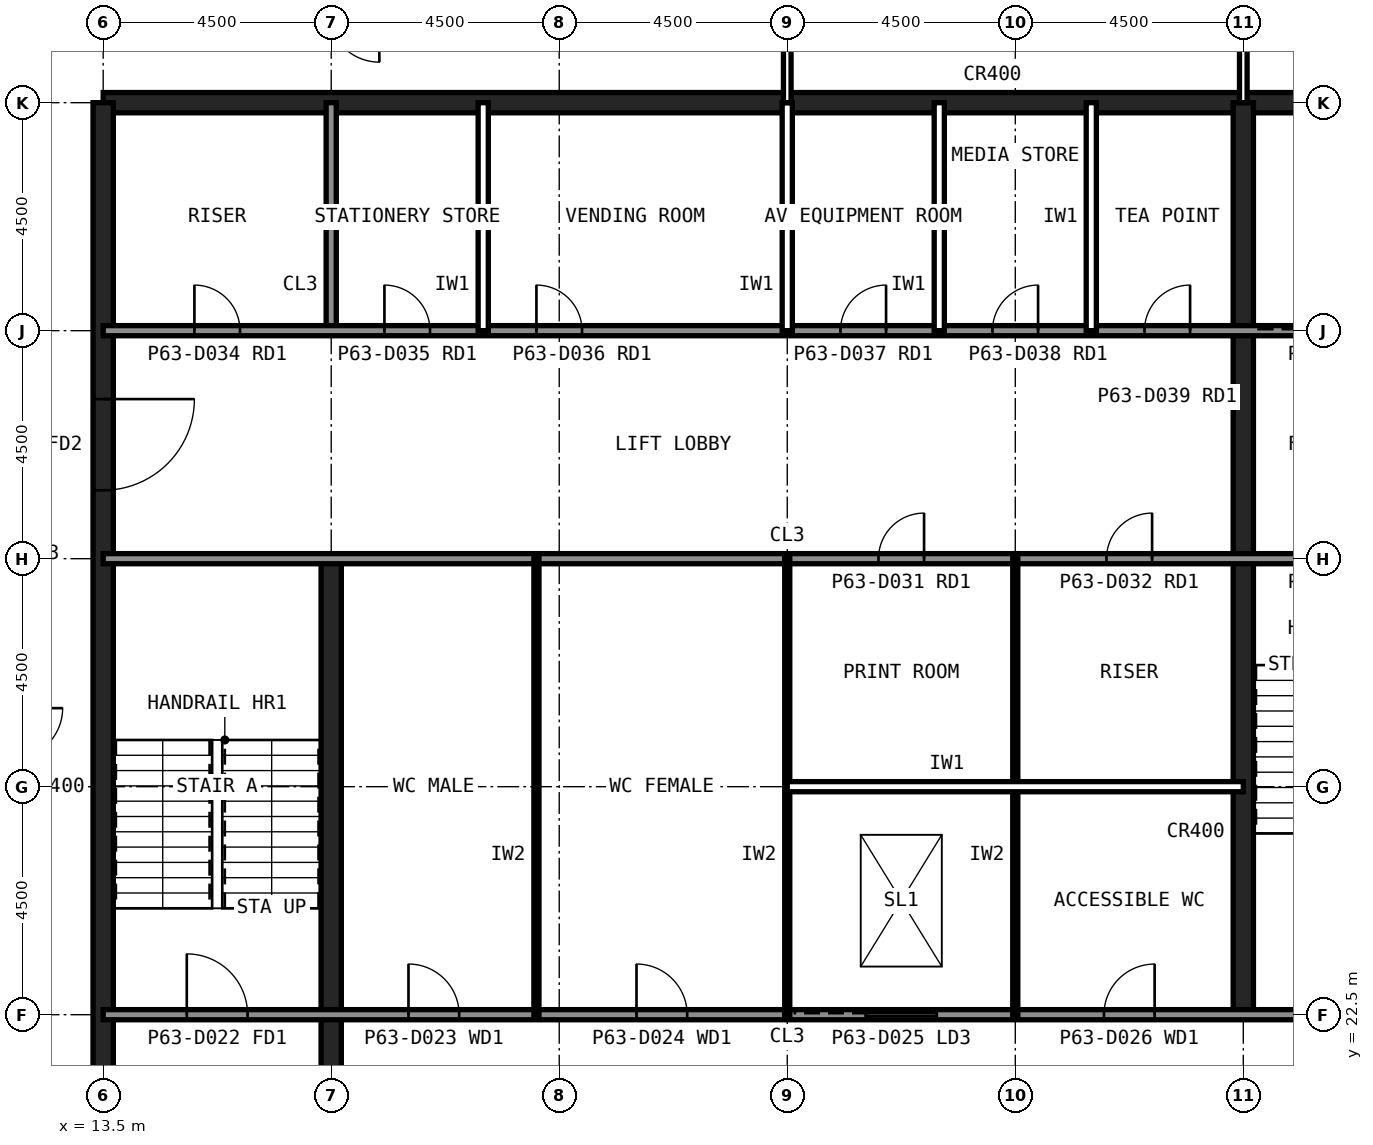
"""IFC4 building model, lengths in metres.
Left out: names, types, materials, properties, quantities, classifications, styles, units other than length and angle.
Written with IfcOpenShell. Run it as: python <this file> out.ifc"""

import sys

from ifc_helpers import new_model, si_unit, direction, frame, frame_2d, origin, place, context, subcontext, project, spatial, rectangle, extrude, element, fill, save


model = new_model("IFC4")
c1 = context("Model", 3, precision=1e-05, world=origin(), true_north=direction((0.0, 1.0)))
c2 = subcontext(c1, "Body", "Model", "MODEL_VIEW")
j1 = project(units=[si_unit("LENGTHUNIT", "METRE"), si_unit("PLANEANGLEUNIT", "RADIAN")], contexts=[c1])
p1 = place(None, origin())
s1 = spatial("IfcSite", under=j1, at=p1, CompositionType="ELEMENT")
p2 = place(p1, origin())
s2 = spatial("IfcBuilding", under=s1, at=p2, CompositionType="ELEMENT")
p3 = place(p2, frame((0.0, 0.0, 262.6)))
s3 = spatial("IfcBuildingStorey", under=s2, at=p3, CompositionType="ELEMENT", Elevation=262.6)
p4 = place(p3, frame((40.5, 40.5, 0.0), z_axis=(0.0, 0.0, 1.0), x_axis=(-1.0, 0.0, 0.0)))
e1 = element("IfcWall", 1, at=p4, inside=s3, PredefinedType="SHEAR", context=c2, shape_type="SweptSolid", body=[
    extrude(rectangle(XDim=27.0, YDim=0.4, at=frame_2d((13.5, 0.0))), origin(), (0.0, 0.0, 1.0), 4.0),
])
p5 = place(p3, frame((13.5, 40.5, 0.0), z_axis=(0.0, 0.0, 1.0), x_axis=(0.0, -1.0, 0.0)))
e2 = element("IfcWall", 2, at=p5, inside=s3, PredefinedType="SHEAR", context=c2, shape_type="SweptSolid", body=[
    extrude(rectangle(XDim=27.0, YDim=0.4, at=frame_2d((13.5, 0.0))), origin(), (0.0, 0.0, 1.0), 4.0),
])
p6 = place(p5, frame((19.65, 0.0, 0.0)))
e3 = element("IfcOpeningElement", 3, at=p6, cuts=e2, PredefinedType="OPENING", context=c2, shape_type="SweptSolid", body=[
    extrude(rectangle(XDim=1.2, YDim=2.1, at=frame_2d((0.6, 1.05))), frame((0.0, 0.21, 0.0), z_axis=(0.0, -1.0, 0.0), x_axis=(1.0, 0.0, 0.0)), (0.0, 0.0, 1.0), 0.42),
])
p7 = place(p5, frame((5.85, 0.0, 0.0)))
e4 = element("IfcOpeningElement", 4, at=p7, cuts=e2, PredefinedType="OPENING", context=c2, shape_type="SweptSolid", body=[
    extrude(rectangle(XDim=1.8, YDim=2.1, at=frame_2d((0.9, 1.05))), frame((0.0, 0.21, 0.0), z_axis=(0.0, -1.0, 0.0), x_axis=(1.0, 0.0, 0.0)), (0.0, 0.0, 1.0), 0.42),
])
p8 = place(p3, frame((18.0, 13.5, 0.0), z_axis=(0.0, 0.0, 1.0), x_axis=(0.0, 1.0, 0.0)))
e5 = element("IfcWall", 5, at=p8, inside=s3, PredefinedType="SHEAR", context=c2, shape_type="SweptSolid", body=[
    extrude(rectangle(XDim=18.0, YDim=0.4, at=frame_2d((9.0, 0.0))), origin(), (0.0, 0.0, 1.0), 4.0),
])
p9 = place(p3, frame((18.0, 36.0, 0.0), z_axis=(0.0, 0.0, 1.0), x_axis=(0.0, 1.0, 0.0)))
e6 = element("IfcWall", 6, at=p9, inside=s3, PredefinedType="SOLIDWALL", context=c2, shape_type="SweptSolid", body=[
    extrude(rectangle(XDim=4.5, YDim=0.2, at=frame_2d((2.25, 0.0))), origin(), (0.0, 0.0, 1.0), 3.84),
])
p10 = place(p3, frame((36.0, 22.5, 0.0), z_axis=(0.0, 0.0, 1.0), x_axis=(0.0, 1.0, 0.0)))
e7 = element("IfcWall", 7, at=p10, inside=s3, PredefinedType="SHEAR", context=c2, shape_type="SweptSolid", body=[
    extrude(rectangle(XDim=18.0, YDim=0.4, at=frame_2d((9.0, 0.0))), origin(), (0.0, 0.0, 1.0), 4.0),
])
p11 = place(p3, frame((13.5, 36.0, 0.0), z_axis=(0.0, 0.0, 1.0), x_axis=(1.0, 0.0, 0.0)))
e8 = element("IfcWall", 8, at=p11, inside=s3, PredefinedType="SOLIDWALL", context=c2, shape_type="SweptSolid", body=[
    extrude(rectangle(XDim=27.0, YDim=0.2, at=frame_2d((13.5, 0.0))), origin(), (0.0, 0.0, 1.0), 3.84),
])
p12 = place(p11, frame((1.8, 0.0, 0.0)))
e9 = element("IfcOpeningElement", 9, at=p12, cuts=e8, PredefinedType="OPENING", context=c2, shape_type="SweptSolid", body=[
    extrude(rectangle(XDim=0.9, YDim=2.1, at=frame_2d((0.45, 1.05))), frame((0.0, 0.11, 0.0), z_axis=(0.0, -1.0, 0.0), x_axis=(1.0, 0.0, 0.0)), (0.0, 0.0, 1.0), 0.22),
])
p13 = place(p11, frame((5.55, 0.0, 0.0)))
e10 = element("IfcOpeningElement", 10, at=p13, cuts=e8, PredefinedType="OPENING", context=c2, shape_type="SweptSolid", body=[
    extrude(rectangle(XDim=0.9, YDim=2.1, at=frame_2d((0.45, 1.05))), frame((0.0, 0.11, 0.0), z_axis=(0.0, -1.0, 0.0), x_axis=(1.0, 0.0, 0.0)), (0.0, 0.0, 1.0), 0.22),
])
p14 = place(p11, frame((11.55, 0.0, 0.0)))
e11 = element("IfcOpeningElement", 11, at=p14, cuts=e8, PredefinedType="OPENING", context=c2, shape_type="SweptSolid", body=[
    extrude(rectangle(XDim=0.9, YDim=2.1, at=frame_2d((0.45, 1.05))), frame((0.0, 0.11, 0.0), z_axis=(0.0, -1.0, 0.0), x_axis=(1.0, 0.0, 0.0)), (0.0, 0.0, 1.0), 0.22),
])
p15 = place(p11, frame((14.55, 0.0, 0.0)))
e12 = element("IfcOpeningElement", 12, at=p15, cuts=e8, PredefinedType="OPENING", context=c2, shape_type="SweptSolid", body=[
    extrude(rectangle(XDim=0.9, YDim=2.1, at=frame_2d((0.45, 1.05))), frame((0.0, 0.11, 0.0), z_axis=(0.0, -1.0, 0.0), x_axis=(1.0, 0.0, 0.0)), (0.0, 0.0, 1.0), 0.22),
])
p16 = place(p11, frame((24.1, 0.0, 0.0)))
e13 = element("IfcOpeningElement", 13, at=p16, cuts=e8, PredefinedType="OPENING", context=c2, shape_type="SweptSolid", body=[
    extrude(rectangle(XDim=1.3, YDim=2.2, at=frame_2d((0.65, 1.1))), frame((0.0, 0.11, 0.0), z_axis=(0.0, -1.0, 0.0), x_axis=(1.0, 0.0, 0.0)), (0.0, 0.0, 1.0), 0.22),
])
p17 = place(p3, frame((13.5, 22.5, 0.0), z_axis=(0.0, 0.0, 1.0), x_axis=(1.0, 0.0, 0.0)))
e14 = element("IfcWall", 14, at=p17, inside=s3, PredefinedType="SOLIDWALL", context=c2, shape_type="SweptSolid", body=[
    extrude(rectangle(XDim=27.0, YDim=0.2, at=frame_2d((13.5, 0.0))), origin(), (0.0, 0.0, 1.0), 3.84),
])
p18 = place(p17, frame((1.65, 0.0, 0.0)))
e15 = element("IfcOpeningElement", 15, at=p18, cuts=e14, PredefinedType="OPENING", context=c2, shape_type="SweptSolid", body=[
    extrude(rectangle(XDim=1.2, YDim=2.1, at=frame_2d((0.6, 1.05))), frame((0.0, 0.11, 0.0), z_axis=(0.0, -1.0, 0.0), x_axis=(1.0, 0.0, 0.0)), (0.0, 0.0, 1.0), 0.22),
])
p19 = place(p17, frame((6.025, 0.0, 0.0)))
e16 = element("IfcOpeningElement", 16, at=p19, cuts=e14, PredefinedType="OPENING", context=c2, shape_type="SweptSolid", body=[
    extrude(rectangle(XDim=1.0, YDim=2.1, at=frame_2d((0.5, 1.05))), frame((0.0, 0.11, 0.0), z_axis=(0.0, -1.0, 0.0), x_axis=(1.0, 0.0, 0.0)), (0.0, 0.0, 1.0), 0.22),
])
p20 = place(p17, frame((10.525, 0.0, 0.0)))
e17 = element("IfcOpeningElement", 17, at=p20, cuts=e14, PredefinedType="OPENING", context=c2, shape_type="SweptSolid", body=[
    extrude(rectangle(XDim=1.0, YDim=2.1, at=frame_2d((0.5, 1.05))), frame((0.0, 0.11, 0.0), z_axis=(0.0, -1.0, 0.0), x_axis=(1.0, 0.0, 0.0)), (0.0, 0.0, 1.0), 0.22),
])
p21 = place(p17, frame((19.75, 0.0, 0.0)))
e18 = element("IfcOpeningElement", 18, at=p21, cuts=e14, PredefinedType="OPENING", context=c2, shape_type="SweptSolid", body=[
    extrude(rectangle(XDim=1.0, YDim=2.1, at=frame_2d((0.5, 1.05))), frame((0.0, 0.11, 0.0), z_axis=(0.0, -1.0, 0.0), x_axis=(1.0, 0.0, 0.0)), (0.0, 0.0, 1.0), 0.22),
])
p22 = place(p17, frame((15.05, 0.0, 0.0)))
e19 = element("IfcOpeningElement", 19, at=p22, cuts=e14, PredefinedType="OPENING", context=c2, shape_type="SweptSolid", body=[
    extrude(rectangle(XDim=1.4, YDim=2.4, at=frame_2d((0.7, 1.2))), frame((0.0, 0.11, 0.0), z_axis=(0.0, -1.0, 0.0), x_axis=(1.0, 0.0, 0.0)), (0.0, 0.0, 1.0), 0.22),
])
p23 = place(p3, frame((13.5, 31.5, 0.0), z_axis=(0.0, 0.0, 1.0), x_axis=(1.0, 0.0, 0.0)))
e20 = element("IfcWall", 20, at=p23, inside=s3, PredefinedType="SOLIDWALL", context=c2, shape_type="SweptSolid", body=[
    extrude(rectangle(XDim=27.0, YDim=0.2, at=frame_2d((13.5, 0.0))), origin(), (0.0, 0.0, 1.0), 3.84),
])
p24 = place(p23, frame((24.15, 0.0, 0.0)))
e21 = element("IfcOpeningElement", 21, at=p24, cuts=e20, PredefinedType="OPENING", context=c2, shape_type="SweptSolid", body=[
    extrude(rectangle(XDim=1.2, YDim=2.1, at=frame_2d((0.6, 1.05))), frame((0.0, 0.11, 0.0), z_axis=(0.0, -1.0, 0.0), x_axis=(1.0, 0.0, 0.0)), (0.0, 0.0, 1.0), 0.22),
])
p25 = place(p23, frame((15.3, 0.0, 0.0)))
e22 = element("IfcOpeningElement", 22, at=p25, cuts=e20, PredefinedType="OPENING", context=c2, shape_type="SweptSolid", body=[
    extrude(rectangle(XDim=0.9, YDim=2.1, at=frame_2d((0.45, 1.05))), frame((0.0, 0.11, 0.0), z_axis=(0.0, -1.0, 0.0), x_axis=(1.0, 0.0, 0.0)), (0.0, 0.0, 1.0), 0.22),
])
p26 = place(p23, frame((19.8, 0.0, 0.0)))
e23 = element("IfcOpeningElement", 23, at=p26, cuts=e20, PredefinedType="OPENING", context=c2, shape_type="SweptSolid", body=[
    extrude(rectangle(XDim=0.9, YDim=2.1, at=frame_2d((0.45, 1.05))), frame((0.0, 0.11, 0.0), z_axis=(0.0, -1.0, 0.0), x_axis=(1.0, 0.0, 0.0)), (0.0, 0.0, 1.0), 0.22),
])
for number, where, z_axis, x_axis in (
    (24, (24.0, 36.0, 0.0), (0.0, 0.0, 1.0), (0.0, 1.0, 0.0)),
    (25, (27.0, 36.0, 0.0), (0.0, 0.0, 1.0), (0.0, 1.0, 0.0)),
):
    element("IfcWall", number, at=place(p3, frame(where, z_axis=z_axis, x_axis=x_axis)), inside=s3, PredefinedType="PARTITIONING", context=c2, shape_type="SweptSolid", body=[
        extrude(rectangle(XDim=4.5, YDim=0.2, at=frame_2d((2.25, 0.0))), origin(), (0.0, 0.0, 1.0), 3.84),
    ])
for number, where, z_axis, x_axis in (
    (26, (22.05, 22.5, 0.0), (0.0, 0.0, 1.0), (0.0, 1.0, 0.0)),
    (27, (27.0, 22.5, 0.0), (0.0, 0.0, 1.0), (0.0, 1.0, 0.0)),
    (28, (31.5, 22.5, 0.0), (0.0, 0.0, 1.0), (0.0, 1.0, 0.0)),
):
    element("IfcWall", number, at=place(p3, frame(where, z_axis=z_axis, x_axis=x_axis)), inside=s3, PredefinedType="PLUMBINGWALL", context=c2, shape_type="SweptSolid", body=[
        extrude(rectangle(XDim=9.0, YDim=0.1, at=frame_2d((4.5, 0.0))), origin(), (0.0, 0.0, 1.0), 3.84),
    ])
p27 = place(p3, frame((27.0, 27.0, 0.0), z_axis=(0.0, 0.0, 1.0), x_axis=(1.0, 0.0, 0.0)))
e29 = element("IfcWall", 29, at=p27, inside=s3, PredefinedType="PARTITIONING", context=c2, shape_type="SweptSolid", body=[
    extrude(rectangle(XDim=9.0, YDim=0.2, at=frame_2d((4.5, 0.0))), origin(), (0.0, 0.0, 1.0), 3.84),
])
p28 = place(p3, frame((36.0, 40.5, 0.0), z_axis=(0.0, 0.0, 1.0), x_axis=(0.0, 1.0, 0.0)))
e30 = element("IfcWall", 30, at=p28, inside=s3, PredefinedType="PARTITIONING", context=c2, shape_type="SweptSolid", body=[
    extrude(rectangle(XDim=3.6, YDim=0.15, at=frame_2d((1.8, 0.0))), origin(), (0.0, 0.0, 1.0), 2.989),
])
p29 = place(p3, frame((27.0, 44.1, 0.0), z_axis=(0.0, 0.0, 1.0), x_axis=(0.0, -1.0, 0.0)))
e31 = element("IfcWall", 31, at=p29, inside=s3, PredefinedType="PARTITIONING", context=c2, shape_type="SweptSolid", body=[
    extrude(rectangle(XDim=3.6, YDim=0.15, at=frame_2d((1.8, 0.0))), origin(), (0.0, 0.0, 1.0), 2.989),
])
p30 = place(p29, frame((1.3, 0.0, 0.0)))
e32 = element("IfcOpeningElement", 32, at=p30, cuts=e31, PredefinedType="OPENING", context=c2, shape_type="SweptSolid", body=[
    extrude(rectangle(XDim=1.0, YDim=2.1, at=frame_2d((0.5, 1.05))), frame((0.0, 0.085, 0.0), z_axis=(0.0, -1.0, 0.0), x_axis=(1.0, 0.0, 0.0)), (0.0, 0.0, 1.0), 0.17),
])
p31 = place(p7, origin())
e33 = element("IfcDoor", 33, at=p31, inside=s3, OperationType="SINGLE_SWING_LEFT", PredefinedType="DOOR", context=c2, shape_type="SweptSolid", body=[
    extrude(rectangle(XDim=1.8, YDim=2.1, at=frame_2d((0.9, 1.05))), frame((0.0, 0.025, 0.0), z_axis=(0.0, -1.0, 0.0), x_axis=(1.0, 0.0, 0.0)), (0.0, 0.0, 1.0), 0.05),
])
fill(e4, e33)
p32 = place(p18, origin())
e34 = element("IfcDoor", 34, at=p32, inside=s3, OperationType="SINGLE_SWING_LEFT", PredefinedType="DOOR", context=c2, shape_type="SweptSolid", body=[
    extrude(rectangle(XDim=1.2, YDim=2.1, at=frame_2d((0.6, 1.05))), frame((0.0, 0.025, 0.0), z_axis=(0.0, -1.0, 0.0), x_axis=(1.0, 0.0, 0.0)), (0.0, 0.0, 1.0), 0.05),
])
fill(e15, e34)
p33 = place(p19, origin())
e35 = element("IfcDoor", 35, at=p33, inside=s3, OperationType="SINGLE_SWING_LEFT", PredefinedType="DOOR", context=c2, shape_type="SweptSolid", body=[
    extrude(rectangle(XDim=1.0, YDim=2.1, at=frame_2d((0.5, 1.05))), frame((0.0, 0.025, 0.0), z_axis=(0.0, -1.0, 0.0), x_axis=(1.0, 0.0, 0.0)), (0.0, 0.0, 1.0), 0.05),
])
fill(e16, e35)
p34 = place(p20, origin())
e36 = element("IfcDoor", 36, at=p34, inside=s3, OperationType="SINGLE_SWING_LEFT", PredefinedType="DOOR", context=c2, shape_type="SweptSolid", body=[
    extrude(rectangle(XDim=1.0, YDim=2.1, at=frame_2d((0.5, 1.05))), frame((0.0, 0.025, 0.0), z_axis=(0.0, -1.0, 0.0), x_axis=(1.0, 0.0, 0.0)), (0.0, 0.0, 1.0), 0.05),
])
fill(e17, e36)
p35 = place(p21, origin())
e37 = element("IfcDoor", 37, at=p35, inside=s3, OperationType="SINGLE_SWING_RIGHT", PredefinedType="DOOR", context=c2, shape_type="SweptSolid", body=[
    extrude(rectangle(XDim=1.0, YDim=2.1, at=frame_2d((0.5, 1.05))), frame((0.0, 0.025, 0.0), z_axis=(0.0, -1.0, 0.0), x_axis=(1.0, 0.0, 0.0)), (0.0, 0.0, 1.0), 0.05),
])
fill(e18, e37)
p36 = place(p25, origin())
e38 = element("IfcDoor", 38, at=p36, inside=s3, OperationType="SINGLE_SWING_RIGHT", PredefinedType="DOOR", context=c2, shape_type="SweptSolid", body=[
    extrude(rectangle(XDim=0.9, YDim=2.1, at=frame_2d((0.45, 1.05))), frame((0.0, 0.025, 0.0), z_axis=(0.0, -1.0, 0.0), x_axis=(1.0, 0.0, 0.0)), (0.0, 0.0, 1.0), 0.05),
])
fill(e22, e38)
p37 = place(p26, origin())
e39 = element("IfcDoor", 39, at=p37, inside=s3, OperationType="SINGLE_SWING_RIGHT", PredefinedType="DOOR", context=c2, shape_type="SweptSolid", body=[
    extrude(rectangle(XDim=0.9, YDim=2.1, at=frame_2d((0.45, 1.05))), frame((0.0, 0.025, 0.0), z_axis=(0.0, -1.0, 0.0), x_axis=(1.0, 0.0, 0.0)), (0.0, 0.0, 1.0), 0.05),
])
fill(e23, e39)
p38 = place(p12, origin())
e40 = element("IfcDoor", 40, at=p38, inside=s3, OperationType="SINGLE_SWING_LEFT", PredefinedType="DOOR", context=c2, shape_type="SweptSolid", body=[
    extrude(rectangle(XDim=0.9, YDim=2.1, at=frame_2d((0.45, 1.05))), frame((0.0, 0.025, 0.0), z_axis=(0.0, -1.0, 0.0), x_axis=(1.0, 0.0, 0.0)), (0.0, 0.0, 1.0), 0.05),
])
fill(e9, e40)
p39 = place(p13, origin())
e41 = element("IfcDoor", 41, at=p39, inside=s3, OperationType="SINGLE_SWING_LEFT", PredefinedType="DOOR", context=c2, shape_type="SweptSolid", body=[
    extrude(rectangle(XDim=0.9, YDim=2.1, at=frame_2d((0.45, 1.05))), frame((0.0, 0.025, 0.0), z_axis=(0.0, -1.0, 0.0), x_axis=(1.0, 0.0, 0.0)), (0.0, 0.0, 1.0), 0.05),
])
fill(e10, e41)
p40 = place(p14, origin())
e42 = element("IfcDoor", 42, at=p40, inside=s3, OperationType="SINGLE_SWING_LEFT", PredefinedType="DOOR", context=c2, shape_type="SweptSolid", body=[
    extrude(rectangle(XDim=0.9, YDim=2.1, at=frame_2d((0.45, 1.05))), frame((0.0, 0.025, 0.0), z_axis=(0.0, -1.0, 0.0), x_axis=(1.0, 0.0, 0.0)), (0.0, 0.0, 1.0), 0.05),
])
fill(e11, e42)
p41 = place(p15, origin())
e43 = element("IfcDoor", 43, at=p41, inside=s3, OperationType="SINGLE_SWING_RIGHT", PredefinedType="DOOR", context=c2, shape_type="SweptSolid", body=[
    extrude(rectangle(XDim=0.9, YDim=2.1, at=frame_2d((0.45, 1.05))), frame((0.0, 0.025, 0.0), z_axis=(0.0, -1.0, 0.0), x_axis=(1.0, 0.0, 0.0)), (0.0, 0.0, 1.0), 0.05),
])
fill(e12, e43)
p42 = place(p22, origin())
e44 = element("IfcDoor", 44, at=p42, inside=s3, OperationType="SLIDING_TO_LEFT", PredefinedType="DOOR", context=c2, shape_type="SweptSolid", body=[
    extrude(rectangle(XDim=1.4, YDim=2.4, at=frame_2d((0.7, 1.2))), frame((0.0, 0.025, 0.0), z_axis=(0.0, -1.0, 0.0), x_axis=(1.0, 0.0, 0.0)), (0.0, 0.0, 1.0), 0.05),
])
fill(e19, e44)
save(model, sys.argv[1])
